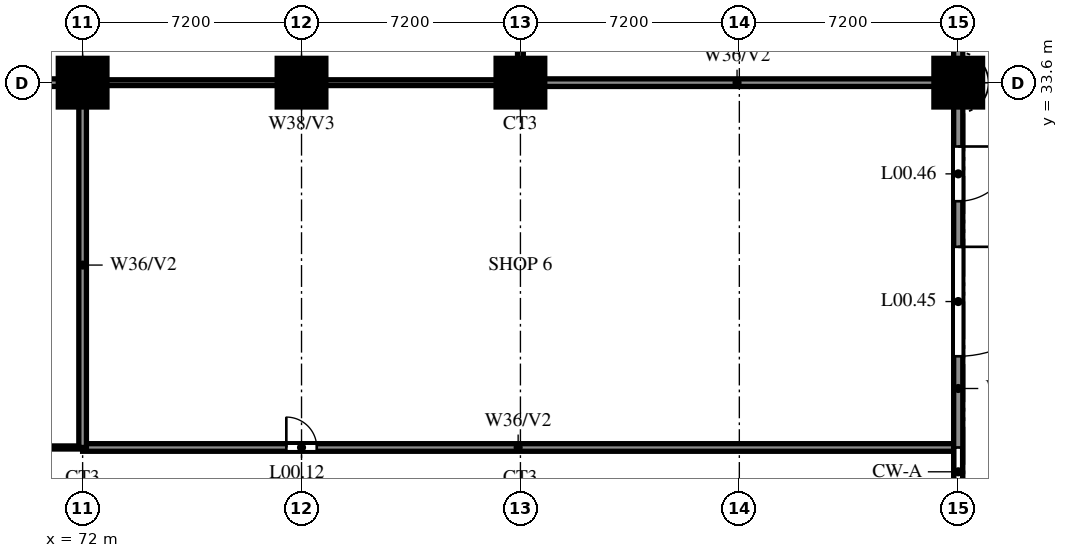
"""IFC4 building model, lengths in metres.
Left out: names, types, materials, properties, quantities, classifications, styles, units other than length and angle.
Written with IfcOpenShell. Run it as: python <this file> out.ifc"""

import sys

from ifc_helpers import new_model, si_unit, direction, frame, frame_2d, origin, origin_2d, place, context, subcontext, project, spatial, rectangle, circle, extrude, source, transform, mapped, element, fill, save


model = new_model("IFC4")
c1 = context("Model", 3, precision=1e-05, world=origin(), true_north=direction((0.0, 1.0)))
c2 = subcontext(c1, "Body", "Model", "MODEL_VIEW")
j1 = project(units=[si_unit("LENGTHUNIT", "METRE"), si_unit("PLANEANGLEUNIT", "RADIAN")], contexts=[c1])
p1 = place(None, origin())
s1 = spatial("IfcSite", under=j1, at=p1, CompositionType="ELEMENT")
p2 = place(p1, origin())
s2 = spatial("IfcBuilding", under=s1, at=p2, CompositionType="ELEMENT")
p3 = place(p2, origin())
s3 = spatial("IfcBuildingStorey", under=s2, at=p3, CompositionType="ELEMENT", Elevation=0.0)
m1 = source(origin(), c2, "Body", "SweptSolid", [
    extrude(circle(Radius=0.8, at=origin_2d()), origin(), (0.0, 0.0, 1.0), 7.4),
])
for number, where, z_axis, x_axis in (
    (1, (72.0, 33.6, 0.0), (0.0, 0.0, 1.0), (1.0, 0.0, 0.0)),
    (2, (79.2, 33.6, 0.0), (0.0, 0.0, 1.0), (1.0, 0.0, 0.0)),
    (3, (86.4, 33.6, 0.0), (0.0, 0.0, 1.0), (1.0, 0.0, 0.0)),
    (4, (100.8, 33.6, 0.0), (0.0, 0.0, 1.0), (1.0, 0.0, 0.0)),
):
    element("IfcColumn", number, at=place(p3, frame(where, z_axis=z_axis, x_axis=x_axis)), inside=s3, PredefinedType="COLUMN", context=c2, shape_type="MappedRepresentation", body=[
        mapped(m1, transform((0.0, 0.0, 0.0))),
    ])
p4 = place(p3, frame((43.2, 21.6, 0.0), z_axis=(0.0, 0.0, 1.0), x_axis=(1.0, 0.0, 0.0)))
e5 = element("IfcWall", 5, at=p4, inside=s3, PredefinedType="PARTITIONING", context=c2, shape_type="SweptSolid", body=[
    extrude(rectangle(XDim=28.8, YDim=0.1, at=frame_2d((14.4, 0.0))), origin(), (0.0, 0.0, 1.0), 6.2),
])
p5 = place(p4, frame((2.3, 0.0, 0.0)))
e6 = element("IfcOpeningElement", 6, at=p5, cuts=e5, PredefinedType="OPENING", context=c2, shape_type="SweptSolid", body=[
    extrude(rectangle(XDim=1.4, YDim=2.1, at=frame_2d((0.7, 1.05))), frame((0.0, 0.06, 0.0), z_axis=(0.0, -1.0, 0.0), x_axis=(1.0, 0.0, 0.0)), (0.0, 0.0, 1.0), 0.12),
])
p6 = place(p4, frame((3.9, 0.0, 0.0)))
e7 = element("IfcOpeningElement", 7, at=p6, cuts=e5, PredefinedType="OPENING", context=c2, shape_type="SweptSolid", body=[
    extrude(rectangle(XDim=1.4, YDim=2.1, at=frame_2d((0.7, 1.05))), frame((0.0, 0.06, 0.0), z_axis=(0.0, -1.0, 0.0), x_axis=(1.0, 0.0, 0.0)), (0.0, 0.0, 1.0), 0.12),
])
p7 = place(p4, frame((5.5, 0.0, 0.0)))
e8 = element("IfcOpeningElement", 8, at=p7, cuts=e5, PredefinedType="OPENING", context=c2, shape_type="SweptSolid", body=[
    extrude(rectangle(XDim=1.4, YDim=2.1, at=frame_2d((0.7, 1.05))), frame((0.0, 0.06, 0.0), z_axis=(0.0, -1.0, 0.0), x_axis=(1.0, 0.0, 0.0)), (0.0, 0.0, 1.0), 0.12),
])
p8 = place(p4, frame((7.1, 0.0, 0.0)))
e9 = element("IfcOpeningElement", 9, at=p8, cuts=e5, PredefinedType="OPENING", context=c2, shape_type="SweptSolid", body=[
    extrude(rectangle(XDim=1.4, YDim=2.1, at=frame_2d((0.7, 1.05))), frame((0.0, 0.06, 0.0), z_axis=(0.0, -1.0, 0.0), x_axis=(1.0, 0.0, 0.0)), (0.0, 0.0, 1.0), 0.12),
])
p9 = place(p4, frame((8.7, 0.0, 0.0)))
e10 = element("IfcOpeningElement", 10, at=p9, cuts=e5, PredefinedType="OPENING", context=c2, shape_type="SweptSolid", body=[
    extrude(rectangle(XDim=1.4, YDim=2.1, at=frame_2d((0.7, 1.05))), frame((0.0, 0.06, 0.0), z_axis=(0.0, -1.0, 0.0), x_axis=(1.0, 0.0, 0.0)), (0.0, 0.0, 1.0), 0.12),
])
p10 = place(p4, frame((10.3, 0.0, 0.0)))
e11 = element("IfcOpeningElement", 11, at=p10, cuts=e5, PredefinedType="OPENING", context=c2, shape_type="SweptSolid", body=[
    extrude(rectangle(XDim=1.4, YDim=2.1, at=frame_2d((0.7, 1.05))), frame((0.0, 0.06, 0.0), z_axis=(0.0, -1.0, 0.0), x_axis=(1.0, 0.0, 0.0)), (0.0, 0.0, 1.0), 0.12),
])
p11 = place(p4, frame((11.9, 0.0, 0.0)))
e12 = element("IfcOpeningElement", 12, at=p11, cuts=e5, PredefinedType="OPENING", context=c2, shape_type="SweptSolid", body=[
    extrude(rectangle(XDim=1.4, YDim=2.1, at=frame_2d((0.7, 1.05))), frame((0.0, 0.06, 0.0), z_axis=(0.0, -1.0, 0.0), x_axis=(1.0, 0.0, 0.0)), (0.0, 0.0, 1.0), 0.12),
])
p12 = place(p4, frame((13.5, 0.0, 0.0)))
e13 = element("IfcOpeningElement", 13, at=p12, cuts=e5, PredefinedType="OPENING", context=c2, shape_type="SweptSolid", body=[
    extrude(rectangle(XDim=1.4, YDim=2.1, at=frame_2d((0.7, 1.05))), frame((0.0, 0.06, 0.0), z_axis=(0.0, -1.0, 0.0), x_axis=(1.0, 0.0, 0.0)), (0.0, 0.0, 1.0), 0.12),
])
p13 = place(p4, frame((15.9, 0.0, 0.0)))
e14 = element("IfcOpeningElement", 14, at=p13, cuts=e5, PredefinedType="OPENING", context=c2, shape_type="SweptSolid", body=[
    extrude(rectangle(XDim=1.8, YDim=2.1, at=frame_2d((0.9, 1.05))), frame((0.0, 0.06, 0.0), z_axis=(0.0, -1.0, 0.0), x_axis=(1.0, 0.0, 0.0)), (0.0, 0.0, 1.0), 0.12),
])
p14 = place(p4, frame((18.3, 0.0, 0.0)))
e15 = element("IfcOpeningElement", 15, at=p14, cuts=e5, PredefinedType="OPENING", context=c2, shape_type="SweptSolid", body=[
    extrude(rectangle(XDim=1.8, YDim=2.1, at=frame_2d((0.9, 1.05))), frame((0.0, 0.06, 0.0), z_axis=(0.0, -1.0, 0.0), x_axis=(1.0, 0.0, 0.0)), (0.0, 0.0, 1.0), 0.12),
])
p15 = place(p3, frame((72.0, 21.6, 0.0), z_axis=(0.0, 0.0, 1.0), x_axis=(1.0, 0.0, 0.0)))
e16 = element("IfcWall", 16, at=p15, inside=s3, PredefinedType="SOLIDWALL", context=c2, shape_type="SweptSolid", body=[
    extrude(rectangle(XDim=28.65, YDim=0.25, at=frame_2d((14.325, 0.0))), origin(), (0.0, 0.0, 1.0), 6.2),
])
p16 = place(p15, frame((6.7, 0.0, 0.0)))
e17 = element("IfcOpeningElement", 17, at=p16, cuts=e16, PredefinedType="OPENING", context=c2, shape_type="SweptSolid", body=[
    extrude(rectangle(XDim=1.0, YDim=2.1, at=frame_2d((0.5, 1.05))), frame((0.0, 0.135, 0.0), z_axis=(0.0, -1.0, 0.0), x_axis=(1.0, 0.0, 0.0)), (0.0, 0.0, 1.0), 0.27),
])
p17 = place(p3, frame((72.0, 33.6, 0.0), z_axis=(0.0, 0.0, 1.0), x_axis=(1.0, 0.0, 0.0)))
e18 = element("IfcWall", 18, at=p17, inside=s3, PredefinedType="PARTITIONING", context=c2, shape_type="SweptSolid", body=[
    extrude(rectangle(XDim=14.4, YDim=0.19, at=frame_2d((7.2, 0.0))), origin(), (0.0, 0.0, 1.0), 6.5),
])
p18 = place(p3, frame((86.4, 33.6, 0.0), z_axis=(0.0, 0.0, 1.0), x_axis=(1.0, 0.0, 0.0)))
e19 = element("IfcWall", 19, at=p18, inside=s3, PredefinedType="SOLIDWALL", context=c2, shape_type="SweptSolid", body=[
    extrude(rectangle(XDim=14.25, YDim=0.25, at=frame_2d((7.125, 0.0))), origin(), (0.0, 0.0, 1.0), 6.2),
])
p19 = place(p3, frame((43.2, 33.6, 0.0), z_axis=(0.0, 0.0, 1.0), x_axis=(1.0, 0.0, 0.0)))
e20 = element("IfcWall", 20, at=p19, inside=s3, PredefinedType="SOLIDWALL", context=c2, shape_type="SweptSolid", body=[
    extrude(rectangle(XDim=28.8, YDim=0.25, at=frame_2d((14.4, 0.0))), origin(), (0.0, 0.0, 1.0), 6.5),
])
p20 = place(p3, frame((72.0, 21.6, 0.0), z_axis=(0.0, 0.0, 1.0), x_axis=(0.0, 1.0, 0.0)))
e21 = element("IfcWall", 21, at=p20, inside=s3, PredefinedType="SOLIDWALL", context=c2, shape_type="SweptSolid", body=[
    extrude(rectangle(XDim=12.0, YDim=0.25, at=frame_2d((6.0, 0.0))), origin(), (0.0, 0.0, 1.0), 6.2),
])
p21 = place(p3, frame((86.4, 33.6, 0.0), z_axis=(0.0, 0.0, 1.0), x_axis=(0.0, 1.0, 0.0)))
e22 = element("IfcWall", 22, at=p21, inside=s3, PredefinedType="PARTITIONING", context=c2, shape_type="SweptSolid", body=[
    extrude(rectangle(XDim=17.5, YDim=0.19, at=frame_2d((8.75, 0.0))), origin(), (0.0, 0.0, 1.0), 6.2),
])
p22 = place(p3, frame((100.8, 42.9, 0.0), z_axis=(0.0, 0.0, 1.0), x_axis=(0.0, -1.0, 0.0)))
e23 = element("IfcWall", 23, at=p22, inside=s3, PredefinedType="SOLIDWALL", context=c2, shape_type="SweptSolid", body=[
    extrude(rectangle(XDim=35.2, YDim=0.3, at=frame_2d((17.6, 0.0))), origin(), (0.0, 0.0, 1.0), 7.4),
])
p23 = place(p22, frame((14.7, 0.0, 0.0)))
e24 = element("IfcOpeningElement", 24, at=p23, cuts=e23, PredefinedType="OPENING", context=c2, shape_type="SweptSolid", body=[
    extrude(rectangle(XDim=3.6, YDim=3.0, at=frame_2d((1.8, 1.5))), frame((0.0, 0.16, 0.0), z_axis=(0.0, -1.0, 0.0), x_axis=(1.0, 0.0, 0.0)), (0.0, 0.0, 1.0), 0.32),
])
p24 = place(p22, frame((11.4, 0.0, 0.0)))
e25 = element("IfcOpeningElement", 25, at=p24, cuts=e23, PredefinedType="OPENING", context=c2, shape_type="SweptSolid", body=[
    extrude(rectangle(XDim=1.8, YDim=2.1, at=frame_2d((0.9, 1.05))), frame((0.0, 0.16, 0.0), z_axis=(0.0, -1.0, 0.0), x_axis=(1.0, 0.0, 0.0)), (0.0, 0.0, 1.0), 0.32),
])
p25 = place(p22, frame((28.8, 0.0, 0.0)))
e26 = element("IfcOpeningElement", 26, at=p25, cuts=e23, PredefinedType="OPENING", context=c2, shape_type="SweptSolid", body=[
    extrude(rectangle(XDim=2.4, YDim=2.1, at=frame_2d((1.2, 1.05))), frame((0.0, 0.16, 0.0), z_axis=(0.0, -1.0, 0.0), x_axis=(1.0, 0.0, 0.0)), (0.0, 0.0, 1.0), 0.32),
])
p26 = place(p22, frame((25.8, 0.0, 0.0)))
e27 = element("IfcOpeningElement", 27, at=p26, cuts=e23, PredefinedType="OPENING", context=c2, shape_type="SweptSolid", body=[
    extrude(rectangle(XDim=2.4, YDim=2.1, at=frame_2d((1.2, 1.05))), frame((0.0, 0.16, 0.0), z_axis=(0.0, -1.0, 0.0), x_axis=(1.0, 0.0, 0.0)), (0.0, 0.0, 1.0), 0.32),
])
p27 = place(p22, frame((2.9, 0.0, 0.0)))
e28 = element("IfcOpeningElement", 28, at=p27, cuts=e23, PredefinedType="OPENING", context=c2, shape_type="SweptSolid", body=[
    extrude(rectangle(XDim=3.6, YDim=3.0, at=frame_2d((1.8, 1.5))), frame((0.0, 0.16, 0.0), z_axis=(0.0, -1.0, 0.0), x_axis=(1.0, 0.0, 0.0)), (0.0, 0.0, 1.0), 0.32),
])
p28 = place(p22, frame((0.8, 0.0, 0.0)))
e29 = element("IfcOpeningElement", 29, at=p28, cuts=e23, PredefinedType="OPENING", context=c2, shape_type="SweptSolid", body=[
    extrude(rectangle(XDim=1.8, YDim=2.1, at=frame_2d((0.9, 1.05))), frame((0.0, 0.16, 0.0), z_axis=(0.0, -1.0, 0.0), x_axis=(1.0, 0.0, 0.0)), (0.0, 0.0, 1.0), 0.32),
])
p29 = place(p16, origin())
e30 = element("IfcDoor", 30, at=p29, inside=s3, OperationType="SINGLE_SWING_LEFT", PredefinedType="DOOR", context=c2, shape_type="SweptSolid", body=[
    extrude(rectangle(XDim=1.0, YDim=2.1, at=frame_2d((0.5, 1.05))), frame((0.0, 0.025, 0.0), z_axis=(0.0, -1.0, 0.0), x_axis=(1.0, 0.0, 0.0)), (0.0, 0.0, 1.0), 0.05),
])
fill(e17, e30)
p30 = place(p23, origin())
e31 = element("IfcDoor", 31, at=p30, inside=s3, OperationType="SINGLE_SWING_RIGHT", PredefinedType="DOOR", context=c2, shape_type="SweptSolid", body=[
    extrude(rectangle(XDim=3.6, YDim=3.0, at=frame_2d((1.8, 1.5))), frame((0.0, 0.025, 0.0), z_axis=(0.0, -1.0, 0.0), x_axis=(1.0, 0.0, 0.0)), (0.0, 0.0, 1.0), 0.05),
])
fill(e24, e31)
p31 = place(p24, origin())
e32 = element("IfcDoor", 32, at=p31, inside=s3, OperationType="DOUBLE_DOOR_SINGLE_SWING", PredefinedType="DOOR", context=c2, shape_type="SweptSolid", body=[
    extrude(rectangle(XDim=1.8, YDim=2.1, at=frame_2d((0.9, 1.05))), frame((0.0, 0.025, 0.0), z_axis=(0.0, -1.0, 0.0), x_axis=(1.0, 0.0, 0.0)), (0.0, 0.0, 1.0), 0.05),
])
fill(e25, e32)
save(model, sys.argv[1])
